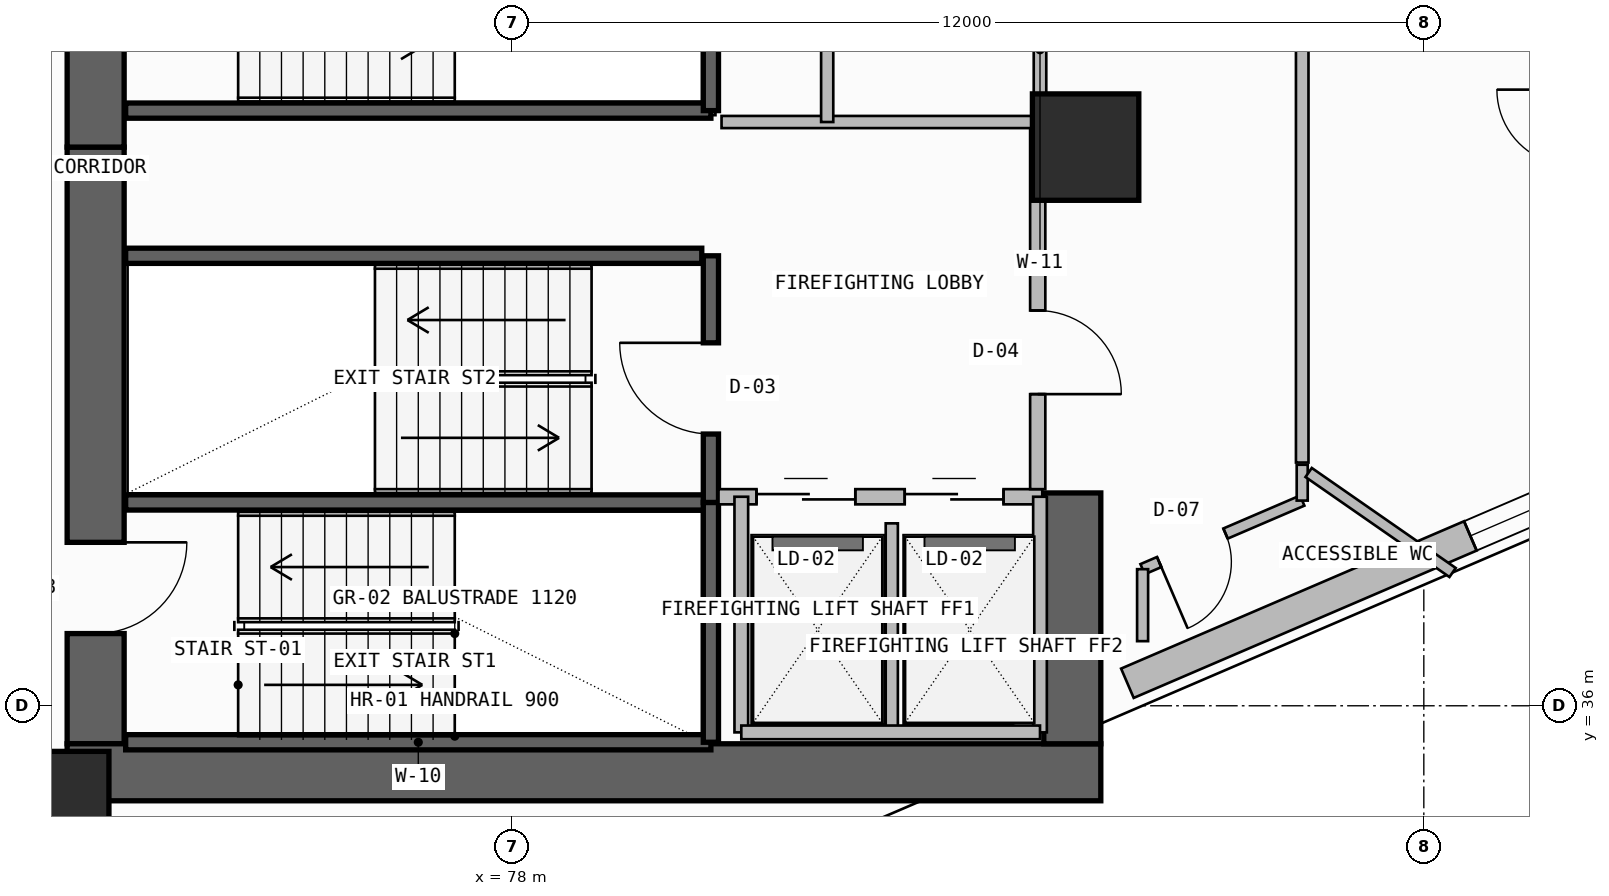
"""IFC4 building model, lengths in metres.
Left out: names, types, materials, properties, quantities, classifications, styles, units other than length and angle.
Written with IfcOpenShell. Run it as: python <this file> out.ifc"""

import sys

from ifc_helpers import new_model, si_unit, direction, frame, frame_2d, origin, origin_2d, place, context, subcontext, project, spatial, rectangle, extrude, element, fill, save


model = new_model("IFC4")
c1 = context("Model", 3, precision=1e-05, world=origin(), true_north=direction((0.0, 1.0)))
c2 = subcontext(c1, "Body", "Model", "MODEL_VIEW")
j1 = project(units=[si_unit("LENGTHUNIT", "METRE"), si_unit("PLANEANGLEUNIT", "RADIAN")], contexts=[c1])
p1 = place(None, origin())
s1 = spatial("IfcSite", under=j1, at=p1, CompositionType="ELEMENT")
p2 = place(p1, origin())
s2 = spatial("IfcBuilding", under=s1, at=p2, CompositionType="ELEMENT")
p3 = place(p2, frame((0.0, 0.0, 171.9)))
s3 = spatial("IfcBuildingStorey", under=s2, at=p3, CompositionType="ELEMENT", Elevation=171.9)
p4 = place(p3, frame((72.525, 35.5, -0.26), z_axis=(0.0, 0.0, 1.0), x_axis=(0.0, 1.0, 0.0)))
e1 = element("IfcWall", 1, at=p4, inside=s3, PredefinedType="SHEAR", context=c2, shape_type="SweptSolid", body=[
    extrude(rectangle(XDim=7.85, YDim=0.75, at=frame_2d((3.925, 0.0))), origin(), (0.0, 0.0, 1.0), 3.6),
])
p5 = place(p4, frame((1.45, 0.0, 0.26)))
e2 = element("IfcOpeningElement", 2, at=p5, cuts=e1, PredefinedType="OPENING", context=c2, shape_type="SweptSolid", body=[
    extrude(rectangle(XDim=1.2, YDim=2.2, at=frame_2d((0.6, 1.1))), frame((0.0, 0.385, 0.0), z_axis=(0.0, -1.0, 0.0), x_axis=(1.0, 0.0, 0.0)), (0.0, 0.0, 1.0), 0.77),
])
p6 = place(p3, frame((72.15, 35.125, -0.26), z_axis=(0.0, 0.0, 1.0), x_axis=(1.0, 0.0, 0.0)))
e3 = element("IfcWall", 3, at=p6, inside=s3, PredefinedType="SHEAR", context=c2, shape_type="SweptSolid", body=[
    extrude(rectangle(XDim=13.6, YDim=0.75, at=frame_2d((6.8, 0.0))), origin(), (0.0, 0.0, 1.0), 3.6),
])
p7 = place(p3, frame((85.375, 35.5, -0.26), z_axis=(0.0, 0.0, 1.0), x_axis=(0.0, 1.0, 0.0)))
e4 = element("IfcWall", 4, at=p7, inside=s3, PredefinedType="SHEAR", context=c2, shape_type="SweptSolid", body=[
    extrude(rectangle(XDim=3.3, YDim=0.75, at=frame_2d((1.65, 0.0))), origin(), (0.0, 0.0, 1.0), 3.6),
])
p8 = place(p3, frame((72.525, 43.35, -0.26), z_axis=(0.0, 0.0, 1.0), x_axis=(0.0, 1.0, 0.0)))
e5 = element("IfcWall", 5, at=p8, inside=s3, PredefinedType="SHEAR", context=c2, shape_type="SweptSolid", body=[
    extrude(rectangle(XDim=12.7, YDim=0.75, at=frame_2d((6.35, 0.0))), origin(), (0.0, 0.0, 1.0), 3.6),
])
p9 = place(p8, frame((1.35, 0.0, 0.26)))
e6 = element("IfcOpeningElement", 6, at=p9, cuts=e5, PredefinedType="OPENING", context=c2, shape_type="SweptSolid", body=[
    extrude(rectangle(XDim=1.2, YDim=2.2, at=frame_2d((0.6, 1.1))), frame((0.0, 0.385, 0.0), z_axis=(0.0, -1.0, 0.0), x_axis=(1.0, 0.0, 0.0)), (0.0, 0.0, 1.0), 0.77),
])
for number, where, z_axis, x_axis in (
    (7, (72.0, 34.7, 0.0), (0.0, 0.0, 1.0), (1.0, 0.0, 0.0)),
    (8, (85.55, 43.35, 0.0), (0.0, 0.0, 1.0), (1.0, 0.0, 0.0)),
):
    element("IfcColumn", number, at=place(p3, frame(where, z_axis=z_axis, x_axis=x_axis)), inside=s3, PredefinedType="COLUMN", context=c2, shape_type="SweptSolid", body=[
        extrude(rectangle(XDim=1.4, YDim=1.4, at=origin_2d()), origin(), (0.0, 0.0, 1.0), 3.6),
    ])
p10 = place(p3, frame((86.1, 36.296, 0.0), z_axis=(0.0, 0.0, 1.0), x_axis=(0.918792412723, 0.394741057306, 0.0)))
e9 = element("IfcWall", 9, at=p10, inside=s3, PredefinedType="SOLIDWALL", context=c2, shape_type="SweptSolid", body=[
    extrude(rectangle(XDim=11.794, YDim=0.42, at=frame_2d((5.897, 0.0))), origin(), (0.0, 0.0, 1.0), 2.325),
])
p11 = place(p10, frame((4.911, 0.0, 1.2)))
e10 = element("IfcOpeningElement", 10, at=p11, cuts=e9, PredefinedType="OPENING", context=c2, shape_type="SweptSolid", body=[
    extrude(rectangle(XDim=2.4, YDim=0.9, at=frame_2d((1.2, 0.45))), frame((0.0, 0.22, 0.0), z_axis=(0.0, -1.0, 0.0), x_axis=(1.0, 0.0, 0.0)), (0.0, 0.0, 1.0), 0.44),
])
for number, where, z_axis, x_axis in (
    (11, (72.92, 35.52, -0.26), (0.0, 0.0, 1.0), (1.0, 0.0, 0.0)),
    (12, (72.92, 38.675, -0.26), (0.0, 0.0, 1.0), (1.0, 0.0, 0.0)),
):
    element("IfcWall", number, at=place(p3, frame(where, z_axis=z_axis, x_axis=x_axis)), inside=s3, PredefinedType="SOLIDWALL", context=c2, shape_type="SweptSolid", body=[
        extrude(rectangle(XDim=7.7, YDim=0.2, at=frame_2d((3.85, 0.0))), origin(), (0.0, 0.0, 1.0), 3.6),
    ])
p12 = place(p3, frame((80.62, 35.52, -0.26), z_axis=(0.0, 0.0, 1.0), x_axis=(0.0, 1.0, 0.0)))
e13 = element("IfcWall", 13, at=p12, inside=s3, PredefinedType="SOLIDWALL", context=c2, shape_type="SweptSolid", body=[
    extrude(rectangle(XDim=3.155, YDim=0.2, at=frame_2d((1.578, 0.0))), origin(), (0.0, 0.0, 1.0), 3.6),
])
p13 = place(p3, frame((80.62, 38.675, -0.26), z_axis=(0.0, 0.0, 1.0), x_axis=(0.0, 1.0, 0.0)))
e14 = element("IfcWall", 14, at=p13, inside=s3, PredefinedType="SOLIDWALL", context=c2, shape_type="SweptSolid", body=[
    extrude(rectangle(XDim=3.245, YDim=0.2, at=frame_2d((1.623, 0.0))), origin(), (0.0, 0.0, 1.0), 3.6),
])
p14 = place(p13, frame((0.9, 0.0, 0.26)))
e15 = element("IfcOpeningElement", 15, at=p14, cuts=e14, PredefinedType="OPENING", context=c2, shape_type="SweptSolid", body=[
    extrude(rectangle(XDim=1.2, YDim=2.2, at=frame_2d((0.6, 1.1))), frame((0.0, 0.11, 0.0), z_axis=(0.0, -1.0, 0.0), x_axis=(1.0, 0.0, 0.0)), (0.0, 0.0, 1.0), 0.22),
])
p15 = place(p3, frame((80.72, 38.75, 0.0), z_axis=(0.0, 0.0, 1.0), x_axis=(1.0, 0.0, 0.0)))
e16 = element("IfcWall", 16, at=p15, inside=s3, PredefinedType="SOLIDWALL", context=c2, shape_type="SweptSolid", body=[
    extrude(rectangle(XDim=4.26, YDim=0.2, at=frame_2d((2.13, 0.0))), origin(), (0.0, 0.0, 1.0), 3.34),
])
p16 = place(p15, frame((0.5, 0.0, 0.0)))
e17 = element("IfcOpeningElement", 17, at=p16, cuts=e16, PredefinedType="OPENING", context=c2, shape_type="SweptSolid", body=[
    extrude(rectangle(XDim=1.3, YDim=2.3, at=frame_2d((0.65, 1.15))), frame((0.0, 0.11, 0.0), z_axis=(0.0, -1.0, 0.0), x_axis=(1.0, 0.0, 0.0)), (0.0, 0.0, 1.0), 0.22),
])
p17 = place(p15, frame((2.45, 0.0, 0.0)))
e18 = element("IfcOpeningElement", 18, at=p17, cuts=e16, PredefinedType="OPENING", context=c2, shape_type="SweptSolid", body=[
    extrude(rectangle(XDim=1.3, YDim=2.3, at=frame_2d((0.65, 1.15))), frame((0.0, 0.11, 0.0), z_axis=(0.0, -1.0, 0.0), x_axis=(1.0, 0.0, 0.0)), (0.0, 0.0, 1.0), 0.22),
])
p18 = place(p3, frame((83.0, 35.65, 0.0), z_axis=(0.0, 0.0, 1.0), x_axis=(0.0, 1.0, 0.0)))
e19 = element("IfcWall", 19, at=p18, inside=s3, PredefinedType="PLUMBINGWALL", context=c2, shape_type="SweptSolid", body=[
    extrude(rectangle(XDim=2.75, YDim=0.16, at=frame_2d((1.375, 0.0))), origin(), (0.0, 0.0, 1.0), 3.34),
])
for number, where, z_axis, x_axis in (
    (20, (84.95, 35.65, 0.0), (0.0, 0.0, 1.0), (0.0, 1.0, 0.0)),
    (21, (81.02, 35.65, 0.0), (0.0, 0.0, 1.0), (0.0, 1.0, 0.0)),
):
    element("IfcWall", number, at=place(p3, frame(where, z_axis=z_axis, x_axis=x_axis)), inside=s3, PredefinedType="SOLIDWALL", context=c2, shape_type="SweptSolid", body=[
        extrude(rectangle(XDim=3.1, YDim=0.18, at=frame_2d((1.55, 0.0))), origin(), (0.0, 0.0, 1.0), 3.34),
    ])
p19 = place(p3, frame((81.02, 35.65, 0.0), z_axis=(0.0, 0.0, 1.0), x_axis=(1.0, 0.0, 0.0)))
e22 = element("IfcWall", 22, at=p19, inside=s3, PredefinedType="SOLIDWALL", context=c2, shape_type="SweptSolid", body=[
    extrude(rectangle(XDim=3.93, YDim=0.18, at=frame_2d((1.965, 0.0))), origin(), (0.0, 0.0, 1.0), 3.34),
])
p20 = place(p3, frame((84.92, 38.85, 0.0), z_axis=(0.0, 0.0, 1.0), x_axis=(0.0, 1.0, 0.0)))
e23 = element("IfcWall", 23, at=p20, inside=s3, PredefinedType="SOLIDWALL", context=c2, shape_type="SweptSolid", body=[
    extrude(rectangle(XDim=4.83, YDim=0.2, at=frame_2d((2.415, 0.0))), origin(), (0.0, 0.0, 1.0), 3.34),
])
p21 = place(p20, frame((1.25, 0.0, 0.0)))
e24 = element("IfcOpeningElement", 24, at=p21, cuts=e23, PredefinedType="OPENING", context=c2, shape_type="SweptSolid", body=[
    extrude(rectangle(XDim=1.1, YDim=2.2, at=frame_2d((0.55, 1.1))), frame((0.0, 0.11, 0.0), z_axis=(0.0, -1.0, 0.0), x_axis=(1.0, 0.0, 0.0)), (0.0, 0.0, 1.0), 0.22),
])
p22 = place(p3, frame((72.92, 41.92, -0.26), z_axis=(0.0, 0.0, 1.0), x_axis=(1.0, 0.0, 0.0)))
e25 = element("IfcWall", 25, at=p22, inside=s3, PredefinedType="SOLIDWALL", context=c2, shape_type="SweptSolid", body=[
    extrude(rectangle(XDim=7.58, YDim=0.2, at=frame_2d((3.79, 0.0))), origin(), (0.0, 0.0, 1.0), 3.6),
])
p23 = place(p3, frame((72.92, 43.83, -0.26), z_axis=(0.0, 0.0, 1.0), x_axis=(1.0, 0.0, 0.0)))
e26 = element("IfcWall", 26, at=p23, inside=s3, PredefinedType="SOLIDWALL", context=c2, shape_type="SweptSolid", body=[
    extrude(rectangle(XDim=7.7, YDim=0.2, at=frame_2d((3.85, 0.0))), origin(), (0.0, 0.0, 1.0), 3.6),
])
p24 = place(p3, frame((80.62, 43.83, -0.26), z_axis=(0.0, 0.0, 1.0), x_axis=(0.0, 1.0, 0.0)))
e27 = element("IfcWall", 27, at=p24, inside=s3, PredefinedType="SOLIDWALL", context=c2, shape_type="SweptSolid", body=[
    extrude(rectangle(XDim=3.24, YDim=0.2, at=frame_2d((1.62, 0.0))), origin(), (0.0, 0.0, 1.0), 3.6),
])
p25 = place(p3, frame((84.95, 43.68, 0.0), z_axis=(0.0, 0.0, 1.0), x_axis=(0.0, 1.0, 0.0)))
e28 = element("IfcWall", 28, at=p25, inside=s3, PredefinedType="PLUMBINGWALL", context=c2, shape_type="SweptSolid", body=[
    extrude(rectangle(XDim=1.9, YDim=0.165, at=frame_2d((0.95, 0.0))), origin(), (0.0, 0.0, 1.0), 3.34),
])
p26 = place(p3, frame((80.76, 43.68, 0.0), z_axis=(0.0, 0.0, 1.0), x_axis=(1.0, 0.0, 0.0)))
e29 = element("IfcWall", 29, at=p26, inside=s3, PredefinedType="PLUMBINGWALL", context=c2, shape_type="SweptSolid", body=[
    extrude(rectangle(XDim=4.19, YDim=0.16, at=frame_2d((2.095, 0.0))), origin(), (0.0, 0.0, 1.0), 3.34),
])
p27 = place(p3, frame((82.15, 43.68, 0.0), z_axis=(0.0, 0.0, 1.0), x_axis=(0.0, 1.0, 0.0)))
e30 = element("IfcWall", 30, at=p27, inside=s3, PredefinedType="PLUMBINGWALL", context=c2, shape_type="SweptSolid", body=[
    extrude(rectangle(XDim=1.9, YDim=0.16, at=frame_2d((0.95, 0.0))), origin(), (0.0, 0.0, 1.0), 3.34),
])
p28 = place(p3, frame((86.3, 37.797, 0.0), z_axis=(0.0, 0.0, 1.0), x_axis=(0.918802105609, 0.39471849555, 0.0)))
e31 = element("IfcWall", 31, at=p28, inside=s3, PredefinedType="PARTITIONING", context=c2, shape_type="SweptSolid", body=[
    extrude(rectangle(XDim=2.285, YDim=0.145, at=frame_2d((1.143, 0.0))), origin(), (0.0, 0.0, 1.0), 3.34),
])
p29 = place(p28, frame((0.237, 0.0, 0.0)))
e32 = element("IfcOpeningElement", 32, at=p29, cuts=e31, PredefinedType="OPENING", context=c2, shape_type="SweptSolid", body=[
    extrude(rectangle(XDim=0.95, YDim=2.15, at=frame_2d((0.475, 1.075))), frame((0.0, 0.083, 0.0), z_axis=(0.0, -1.0, 0.0), x_axis=(1.0, 0.0, 0.0)), (0.0, 0.0, 1.0), 0.165),
])
p30 = place(p3, frame((88.4, 38.699, 0.0), z_axis=(0.0, 0.0, 1.0), x_axis=(0.0, 1.0, 0.0)))
e33 = element("IfcWall", 33, at=p30, inside=s3, PredefinedType="PARTITIONING", context=c2, shape_type="SweptSolid", body=[
    extrude(rectangle(XDim=0.472, YDim=0.145, at=frame_2d((0.236, 0.0))), origin(), (0.0, 0.0, 1.0), 3.34),
])
p31 = place(p3, frame((88.485, 39.069, 0.0), z_axis=(0.0, 0.0, 1.0), x_axis=(0.821261101027, -0.570552542663, 0.0)))
e34 = element("IfcWall", 34, at=p31, inside=s3, PredefinedType="PARTITIONING", context=c2, shape_type="SweptSolid", body=[
    extrude(rectangle(XDim=2.306, YDim=0.145, at=frame_2d((1.153, 0.0))), origin(), (0.0, 0.0, 1.0), 3.34),
])
p32 = place(p3, frame((88.4, 39.2, 0.0), z_axis=(0.0, 0.0, 1.0), x_axis=(0.0, 1.0, 0.0)))
e35 = element("IfcWall", 35, at=p32, inside=s3, PredefinedType="PARTITIONING", context=c2, shape_type="SweptSolid", body=[
    extrude(rectangle(XDim=7.406, YDim=0.165, at=frame_2d((3.703, 0.0))), origin(), (0.0, 0.0, 1.0), 2.825),
])
p33 = place(p3, frame((86.3, 36.85, 0.0), z_axis=(0.0, 0.0, 1.0), x_axis=(0.0, 1.0, 0.0)))
e36 = element("IfcWall", 36, at=p33, inside=s3, PredefinedType="PARTITIONING", context=c2, shape_type="SweptSolid", body=[
    extrude(rectangle(XDim=0.947, YDim=0.145, at=frame_2d((0.474, 0.0))), origin(), (0.0, 0.0, 1.0), 3.34),
])
p34 = place(p11, origin())
e37 = element("IfcWindow", 37, at=p34, inside=s3, PartitioningType="SINGLE_PANEL", PredefinedType="WINDOW", context=c2, shape_type="SweptSolid", body=[
    extrude(rectangle(XDim=2.4, YDim=0.9, at=frame_2d((1.2, 0.45))), frame((0.0, 0.03, 0.0), z_axis=(0.0, -1.0, 0.0), x_axis=(1.0, 0.0, 0.0)), (0.0, 0.0, 1.0), 0.06),
])
fill(e10, e37)
p35 = place(p5, frame((1.2, 0.0, 0.0), z_axis=(0.0, 0.0, 1.0), x_axis=(-1.0, 0.0, 0.0)))
e38 = element("IfcDoor", 38, at=p35, inside=s3, OperationType="SINGLE_SWING_LEFT", PredefinedType="USERDEFINED", context=c2, shape_type="SweptSolid", body=[
    extrude(rectangle(XDim=1.2, YDim=2.2, at=frame_2d((0.6, 1.1))), frame((0.0, 0.025, 0.0), z_axis=(0.0, -1.0, 0.0), x_axis=(1.0, 0.0, 0.0)), (0.0, 0.0, 1.0), 0.05),
])
fill(e2, e38)
p36 = place(p14, origin())
e39 = element("IfcDoor", 39, at=p36, inside=s3, OperationType="SINGLE_SWING_RIGHT", PredefinedType="USERDEFINED", context=c2, shape_type="SweptSolid", body=[
    extrude(rectangle(XDim=1.2, YDim=2.2, at=frame_2d((0.6, 1.1))), frame((0.0, 0.025, 0.0), z_axis=(0.0, -1.0, 0.0), x_axis=(1.0, 0.0, 0.0)), (0.0, 0.0, 1.0), 0.05),
])
fill(e15, e39)
p37 = place(p16, origin())
e40 = element("IfcDoor", 40, at=p37, inside=s3, OperationType="DOUBLE_DOOR_SLIDING", PredefinedType="DOOR", context=c2, shape_type="SweptSolid", body=[
    extrude(rectangle(XDim=1.3, YDim=2.3, at=frame_2d((0.65, 1.15))), frame((0.0, 0.025, 0.0), z_axis=(0.0, -1.0, 0.0), x_axis=(1.0, 0.0, 0.0)), (0.0, 0.0, 1.0), 0.05),
])
fill(e17, e40)
p38 = place(p17, origin())
e41 = element("IfcDoor", 41, at=p38, inside=s3, OperationType="DOUBLE_DOOR_SLIDING", PredefinedType="DOOR", context=c2, shape_type="SweptSolid", body=[
    extrude(rectangle(XDim=1.3, YDim=2.3, at=frame_2d((0.65, 1.15))), frame((0.0, 0.025, 0.0), z_axis=(0.0, -1.0, 0.0), x_axis=(1.0, 0.0, 0.0)), (0.0, 0.0, 1.0), 0.05),
])
fill(e18, e41)
p39 = place(p21, frame((1.1, 0.0, 0.0), z_axis=(0.0, 0.0, 1.0), x_axis=(-1.0, 0.0, 0.0)))
e42 = element("IfcDoor", 42, at=p39, inside=s3, OperationType="SINGLE_SWING_RIGHT", PredefinedType="DOOR", context=c2, shape_type="SweptSolid", body=[
    extrude(rectangle(XDim=1.1, YDim=2.2, at=frame_2d((0.55, 1.1))), frame((0.0, 0.025, 0.0), z_axis=(0.0, -1.0, 0.0), x_axis=(1.0, 0.0, 0.0)), (0.0, 0.0, 1.0), 0.05),
])
fill(e24, e42)
p40 = place(p29, frame((0.95, 0.0, 0.0), z_axis=(0.0, 0.0, 1.0), x_axis=(-1.0, 0.0, 0.0)))
e43 = element("IfcDoor", 43, at=p40, inside=s3, OperationType="SINGLE_SWING_RIGHT", PredefinedType="DOOR", context=c2, shape_type="SweptSolid", body=[
    extrude(rectangle(XDim=0.95, YDim=2.15, at=frame_2d((0.475, 1.075))), frame((0.0, 0.025, 0.0), z_axis=(0.0, -1.0, 0.0), x_axis=(1.0, 0.0, 0.0)), (0.0, 0.0, 1.0), 0.05),
])
fill(e32, e43)
save(model, sys.argv[1])
